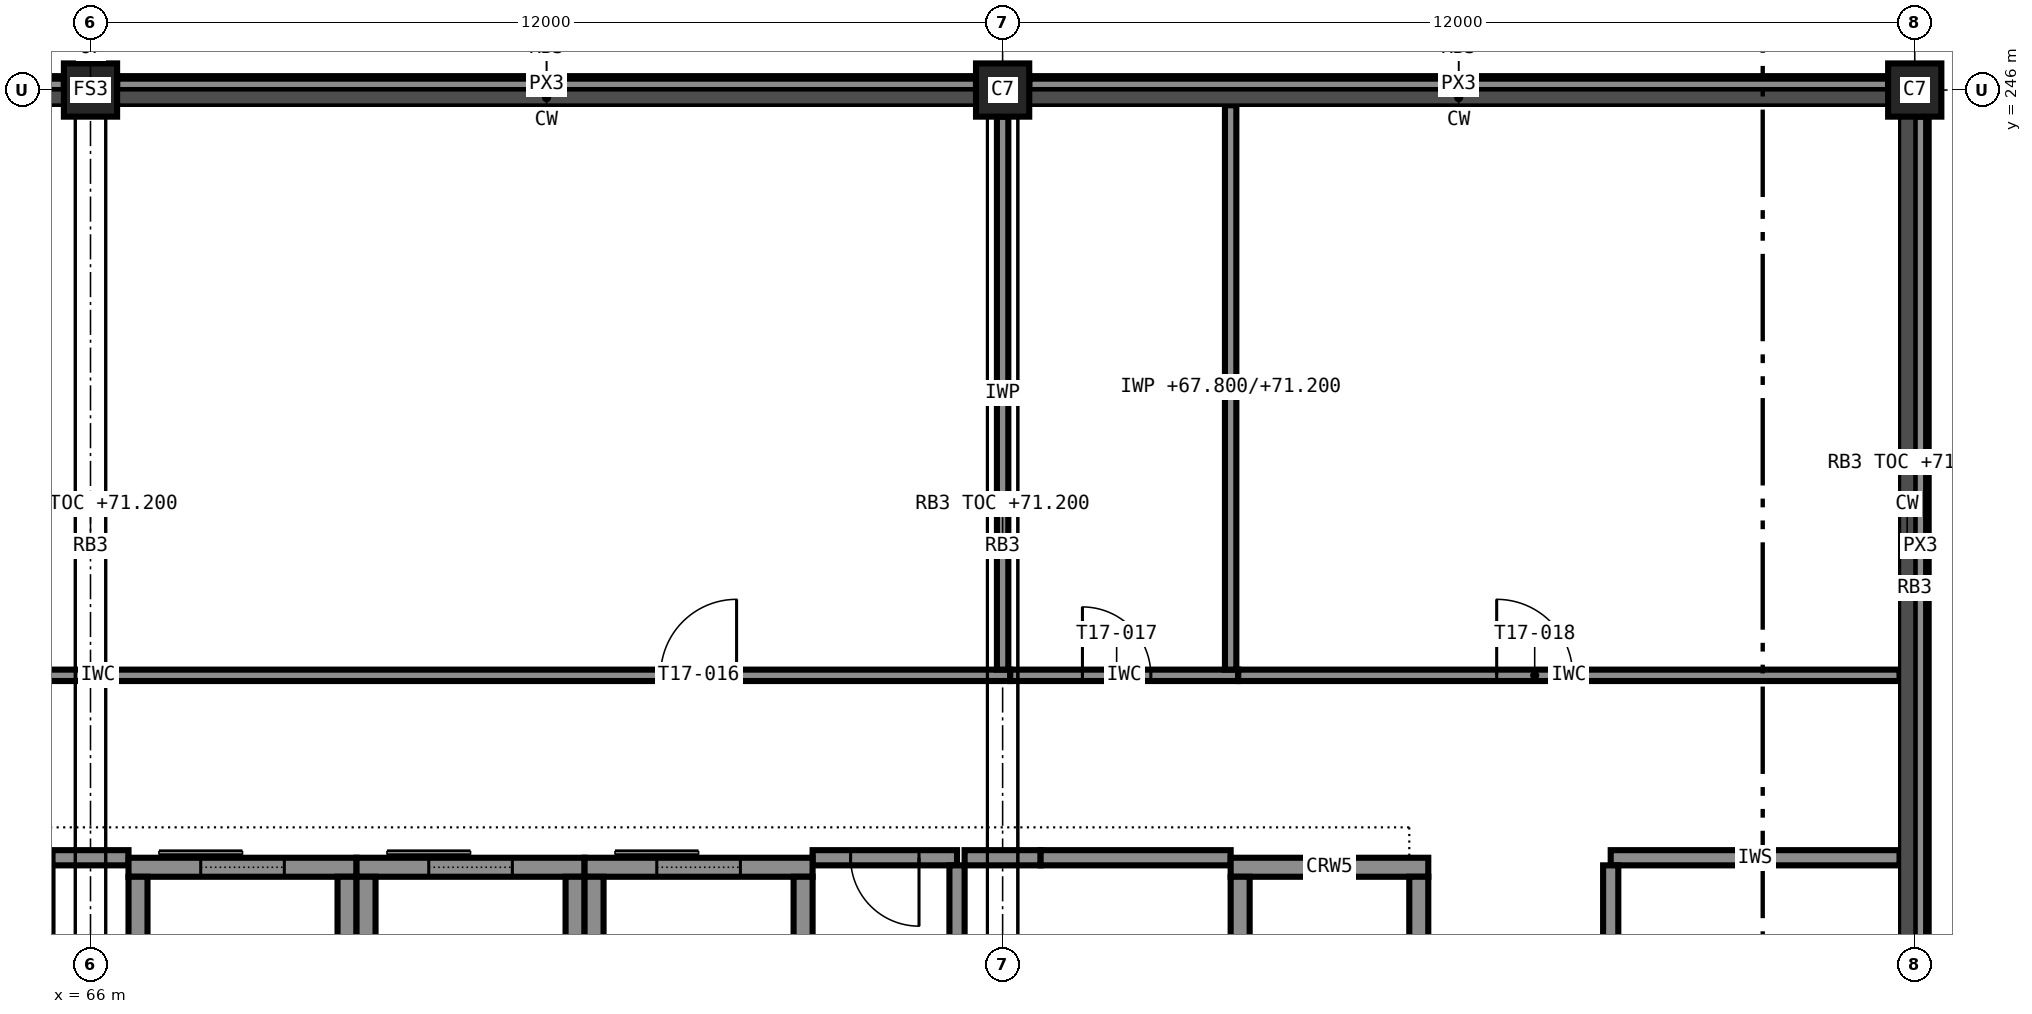
"""IFC4 building model, lengths in metres.
Left out: names, types, materials, properties, quantities, classifications, styles, units other than length and angle.
Written with IfcOpenShell. Run it as: python <this file> out.ifc"""

import sys

from ifc_helpers import new_model, si_unit, direction, frame, frame_2d, origin, origin_2d, place, context, subcontext, project, spatial, rectangle, extrude, element, fill, save


model = new_model("IFC4")
c1 = context("Model", 3, precision=1e-05, world=origin(), true_north=direction((0.0, 1.0)))
c2 = subcontext(c1, "Body", "Model", "MODEL_VIEW")
j1 = project(units=[si_unit("LENGTHUNIT", "METRE"), si_unit("PLANEANGLEUNIT", "RADIAN")], contexts=[c1])
p1 = place(None, origin())
s1 = spatial("IfcSite", under=j1, at=p1, CompositionType="ELEMENT")
p2 = place(p1, origin())
s2 = spatial("IfcBuilding", under=s1, at=p2, CompositionType="ELEMENT")
p3 = place(p2, frame((0.0, 0.0, 67.8)))
s3 = spatial("IfcBuildingStorey", under=s2, at=p3, CompositionType="ELEMENT", Elevation=67.8)
for number, where, z_axis, x_axis in (
    (1, (66.0, 246.0, 0.0), (0.0, 0.0, 1.0), (1.0, 0.0, 0.0)),
    (2, (78.0, 246.0, 0.0), (0.0, 0.0, 1.0), (1.0, 0.0, 0.0)),
    (3, (90.0, 246.0, 0.0), (0.0, 0.0, 1.0), (1.0, 0.0, 0.0)),
):
    element("IfcColumn", number, at=place(p3, frame(where, z_axis=z_axis, x_axis=x_axis)), inside=s3, PredefinedType="COLUMN", context=c2, shape_type="SweptSolid", body=[
        extrude(rectangle(XDim=0.7, YDim=0.7, at=origin_2d()), origin(), (0.0, 0.0, 1.0), 3.6),
    ])
p4 = place(p3, frame((66.5, 235.775, 0.0), z_axis=(0.0, 0.0, 1.0), x_axis=(1.0, 0.0, 0.0)))
e4 = element("IfcWall", 4, at=p4, inside=s3, PredefinedType="SHEAR", context=c2, shape_type="SweptSolid", body=[
    extrude(rectangle(XDim=3.0, YDim=0.25, at=frame_2d((1.5, 0.0))), origin(), (0.0, 0.0, 1.0), 3.6),
])
p5 = place(p4, frame((0.95, 0.0, 0.0)))
e5 = element("IfcOpeningElement", 5, at=p5, cuts=e4, PredefinedType="OPENING", context=c2, shape_type="SweptSolid", body=[
    extrude(rectangle(XDim=1.1, YDim=2.1, at=frame_2d((0.55, 1.05))), frame((0.0, 0.135, 0.0), z_axis=(0.0, -1.0, 0.0), x_axis=(1.0, 0.0, 0.0)), (0.0, 0.0, 1.0), 0.27),
])
for number, where, z_axis, x_axis in (
    (6, (66.625, 232.35, 0.0), (0.0, 0.0, 1.0), (0.0, 1.0, 0.0)),
    (7, (69.375, 232.35, 0.0), (0.0, 0.0, 1.0), (0.0, 1.0, 0.0)),
):
    element("IfcWall", number, at=place(p3, frame(where, z_axis=z_axis, x_axis=x_axis)), inside=s3, PredefinedType="SHEAR", context=c2, shape_type="SweptSolid", body=[
        extrude(rectangle(XDim=3.3, YDim=0.25, at=frame_2d((1.65, 0.0))), origin(), (0.0, 0.0, 1.0), 3.6),
    ])
p6 = place(p3, frame((69.5, 235.775, 0.0), z_axis=(0.0, 0.0, 1.0), x_axis=(1.0, 0.0, 0.0)))
e8 = element("IfcWall", 8, at=p6, inside=s3, PredefinedType="SHEAR", context=c2, shape_type="SweptSolid", body=[
    extrude(rectangle(XDim=3.0, YDim=0.25, at=frame_2d((1.5, 0.0))), origin(), (0.0, 0.0, 1.0), 3.6),
])
p7 = place(p6, frame((0.95, 0.0, 0.0)))
e9 = element("IfcOpeningElement", 9, at=p7, cuts=e8, PredefinedType="OPENING", context=c2, shape_type="SweptSolid", body=[
    extrude(rectangle(XDim=1.1, YDim=2.1, at=frame_2d((0.55, 1.05))), frame((0.0, 0.135, 0.0), z_axis=(0.0, -1.0, 0.0), x_axis=(1.0, 0.0, 0.0)), (0.0, 0.0, 1.0), 0.27),
])
for number, where, z_axis, x_axis in (
    (10, (69.625, 232.35, 0.0), (0.0, 0.0, 1.0), (0.0, 1.0, 0.0)),
    (11, (72.375, 232.35, 0.0), (0.0, 0.0, 1.0), (0.0, 1.0, 0.0)),
):
    element("IfcWall", number, at=place(p3, frame(where, z_axis=z_axis, x_axis=x_axis)), inside=s3, PredefinedType="SHEAR", context=c2, shape_type="SweptSolid", body=[
        extrude(rectangle(XDim=3.3, YDim=0.25, at=frame_2d((1.65, 0.0))), origin(), (0.0, 0.0, 1.0), 3.6),
    ])
p8 = place(p3, frame((72.5, 235.775, 0.0), z_axis=(0.0, 0.0, 1.0), x_axis=(1.0, 0.0, 0.0)))
e12 = element("IfcWall", 12, at=p8, inside=s3, PredefinedType="SHEAR", context=c2, shape_type="SweptSolid", body=[
    extrude(rectangle(XDim=3.0, YDim=0.25, at=frame_2d((1.5, 0.0))), origin(), (0.0, 0.0, 1.0), 3.6),
])
p9 = place(p8, frame((0.95, 0.0, 0.0)))
e13 = element("IfcOpeningElement", 13, at=p9, cuts=e12, PredefinedType="OPENING", context=c2, shape_type="SweptSolid", body=[
    extrude(rectangle(XDim=1.1, YDim=2.1, at=frame_2d((0.55, 1.05))), frame((0.0, 0.135, 0.0), z_axis=(0.0, -1.0, 0.0), x_axis=(1.0, 0.0, 0.0)), (0.0, 0.0, 1.0), 0.27),
])
for number, where, z_axis, x_axis in (
    (14, (72.625, 232.35, 0.0), (0.0, 0.0, 1.0), (0.0, 1.0, 0.0)),
    (15, (75.375, 232.35, 0.0), (0.0, 0.0, 1.0), (0.0, 1.0, 0.0)),
):
    element("IfcWall", number, at=place(p3, frame(where, z_axis=z_axis, x_axis=x_axis)), inside=s3, PredefinedType="SHEAR", context=c2, shape_type="SweptSolid", body=[
        extrude(rectangle(XDim=3.3, YDim=0.25, at=frame_2d((1.65, 0.0))), origin(), (0.0, 0.0, 1.0), 3.6),
    ])
p10 = place(p3, frame((81.0, 235.775, 0.0), z_axis=(0.0, 0.0, 1.0), x_axis=(1.0, 0.0, 0.0)))
e16 = element("IfcWall", 16, at=p10, inside=s3, PredefinedType="SHEAR", context=c2, shape_type="SweptSolid", body=[
    extrude(rectangle(XDim=2.6, YDim=0.25, at=frame_2d((1.3, 0.0))), origin(), (0.0, 0.0, 1.0), 3.6),
])
p11 = place(p3, frame((81.125, 232.35, 0.0), z_axis=(0.0, 0.0, 1.0), x_axis=(0.0, 1.0, 0.0)))
e17 = element("IfcWall", 17, at=p11, inside=s3, PredefinedType="SHEAR", context=c2, shape_type="SweptSolid", body=[
    extrude(rectangle(XDim=3.3, YDim=0.25, at=frame_2d((1.65, 0.0))), origin(), (0.0, 0.0, 1.0), 3.6),
])
p12 = place(p11, frame((1.1, 0.0, 0.0)))
e18 = element("IfcOpeningElement", 18, at=p12, cuts=e17, PredefinedType="OPENING", context=c2, shape_type="SweptSolid", body=[
    extrude(rectangle(XDim=1.1, YDim=2.1, at=frame_2d((0.55, 1.05))), frame((0.0, 0.135, 0.0), z_axis=(0.0, -1.0, 0.0), x_axis=(1.0, 0.0, 0.0)), (0.0, 0.0, 1.0), 0.27),
])
p13 = place(p3, frame((83.475, 232.35, 0.0), z_axis=(0.0, 0.0, 1.0), x_axis=(0.0, 1.0, 0.0)))
e19 = element("IfcWall", 19, at=p13, inside=s3, PredefinedType="SHEAR", context=c2, shape_type="SweptSolid", body=[
    extrude(rectangle(XDim=3.3, YDim=0.25, at=frame_2d((1.65, 0.0))), origin(), (0.0, 0.0, 1.0), 3.6),
])
for number, where, z_axis, x_axis in (
    (20, (90.075, 234.35, 3.4), (0.0, 0.0, 1.0), (0.0, 1.0, 0.0)),
    (21, (89.65, 246.075, 3.4), (0.0, 0.0, 1.0), (-1.0, 0.0, 0.0)),
    (22, (77.65, 246.075, 3.4), (0.0, 0.0, 1.0), (-1.0, 0.0, 0.0)),
    (23, (65.65, 246.075, 3.4), (0.0, 0.0, 1.0), (-1.0, 0.0, 0.0)),
):
    element("IfcWall", number, at=place(p3, frame(where, z_axis=z_axis, x_axis=x_axis)), inside=s3, PredefinedType="STANDARD", context=c2, shape_type="SweptSolid", body=[
        extrude(rectangle(XDim=11.3, YDim=0.15, at=frame_2d((5.65, 0.0))), origin(), (0.0, 0.0, 1.0), 0.2),
    ])
p14 = place(p3, frame((65.5, 235.9, 0.0), z_axis=(0.0, 0.0, 1.0), x_axis=(1.0, 0.0, 0.0)))
e24 = element("IfcWall", 24, at=p14, inside=s3, PredefinedType="PARTITIONING", context=c2, shape_type="SweptSolid", body=[
    extrude(rectangle(XDim=1.0, YDim=0.2, at=frame_2d((0.5, 0.0))), origin(), (0.0, 0.0, 1.0), 3.4),
])
p15 = place(p3, frame((77.4, 235.9, 0.0), z_axis=(0.0, 0.0, 1.0), x_axis=(-1.0, 0.0, 0.0)))
e25 = element("IfcWall", 25, at=p15, inside=s3, PredefinedType="PARTITIONING", context=c2, shape_type="SweptSolid", body=[
    extrude(rectangle(XDim=1.9, YDim=0.2, at=frame_2d((0.95, 0.0))), origin(), (0.0, 0.0, 1.0), 3.4),
])
p16 = place(p15, frame((0.5, 0.0, 0.0)))
e26 = element("IfcOpeningElement", 26, at=p16, cuts=e25, PredefinedType="OPENING", context=c2, shape_type="SweptSolid", body=[
    extrude(rectangle(XDim=0.9, YDim=2.1, at=frame_2d((0.45, 1.05))), frame((0.0, 0.11, 0.0), z_axis=(0.0, -1.0, 0.0), x_axis=(1.0, 0.0, 0.0)), (0.0, 0.0, 1.0), 0.22),
])
p17 = place(p3, frame((77.5, 235.9, 0.0), z_axis=(0.0, 0.0, 1.0), x_axis=(1.0, 0.0, 0.0)))
e27 = element("IfcWall", 27, at=p17, inside=s3, PredefinedType="PARTITIONING", context=c2, shape_type="SweptSolid", body=[
    extrude(rectangle(XDim=1.0, YDim=0.2, at=frame_2d((0.5, 0.0))), origin(), (0.0, 0.0, 1.0), 3.4),
])
p18 = place(p3, frame((78.5, 235.9, 0.0), z_axis=(0.0, 0.0, 1.0), x_axis=(1.0, 0.0, 0.0)))
e28 = element("IfcWall", 28, at=p18, inside=s3, PredefinedType="PARTITIONING", context=c2, shape_type="SweptSolid", body=[
    extrude(rectangle(XDim=2.5, YDim=0.2, at=frame_2d((1.25, 0.0))), origin(), (0.0, 0.0, 1.0), 3.4),
])
p19 = place(p3, frame((86.0, 235.9, 0.0), z_axis=(0.0, 0.0, 1.0), x_axis=(1.0, 0.0, 0.0)))
e29 = element("IfcWall", 29, at=p19, inside=s3, PredefinedType="PARTITIONING", context=c2, shape_type="SweptSolid", body=[
    extrude(rectangle(XDim=3.8, YDim=0.2, at=frame_2d((1.9, 0.0))), origin(), (0.0, 0.0, 1.0), 3.4),
])
p20 = place(p3, frame((77.4, 232.2, 0.0), z_axis=(0.0, 0.0, 1.0), x_axis=(0.0, 1.0, 0.0)))
e30 = element("IfcWall", 30, at=p20, inside=s3, PredefinedType="PARTITIONING", context=c2, shape_type="SweptSolid", body=[
    extrude(rectangle(XDim=3.6, YDim=0.2, at=frame_2d((1.8, 0.0))), origin(), (0.0, 0.0, 1.0), 3.4),
])
p21 = place(p3, frame((86.0, 235.8, 0.0), z_axis=(0.0, 0.0, 1.0), x_axis=(0.0, -1.0, 0.0)))
e31 = element("IfcWall", 31, at=p21, inside=s3, PredefinedType="PARTITIONING", context=c2, shape_type="SweptSolid", body=[
    extrude(rectangle(XDim=3.6, YDim=0.2, at=frame_2d((1.8, 0.0))), origin(), (0.0, 0.0, 1.0), 3.4),
])
p22 = place(p21, frame((1.35, 0.0, 0.0)))
e32 = element("IfcOpeningElement", 32, at=p22, cuts=e31, PredefinedType="OPENING", context=c2, shape_type="SweptSolid", body=[
    extrude(rectangle(XDim=0.9, YDim=2.1, at=frame_2d((0.45, 1.05))), frame((0.0, 0.11, 0.0), z_axis=(0.0, -1.0, 0.0), x_axis=(1.0, 0.0, 0.0)), (0.0, 0.0, 1.0), 0.22),
])
p23 = place(p3, frame((54.1, 238.3, 0.0), z_axis=(0.0, 0.0, 1.0), x_axis=(1.0, 0.0, 0.0)))
e33 = element("IfcWall", 33, at=p23, inside=s3, PredefinedType="PARTITIONING", context=c2, shape_type="SweptSolid", body=[
    extrude(rectangle(XDim=24.0, YDim=0.15, at=frame_2d((12.0, 0.0))), origin(), (0.0, 0.0, 1.0), 3.4),
])
p24 = place(p23, frame((3.4, 0.0, 0.0)))
e34 = element("IfcOpeningElement", 34, at=p24, cuts=e33, PredefinedType="OPENING", context=c2, shape_type="SweptSolid", body=[
    extrude(rectangle(XDim=1.0, YDim=2.1, at=frame_2d((0.5, 1.05))), frame((0.0, 0.085, 0.0), z_axis=(0.0, -1.0, 0.0), x_axis=(1.0, 0.0, 0.0)), (0.0, 0.0, 1.0), 0.17),
])
p25 = place(p23, frame((19.4, 0.0, 0.0)))
e35 = element("IfcOpeningElement", 35, at=p25, cuts=e33, PredefinedType="OPENING", context=c2, shape_type="SweptSolid", body=[
    extrude(rectangle(XDim=1.0, YDim=2.1, at=frame_2d((0.5, 1.05))), frame((0.0, 0.085, 0.0), z_axis=(0.0, -1.0, 0.0), x_axis=(1.0, 0.0, 0.0)), (0.0, 0.0, 1.0), 0.17),
])
p26 = place(p3, frame((78.1, 238.3, 0.0), z_axis=(0.0, 0.0, 1.0), x_axis=(1.0, 0.0, 0.0)))
e36 = element("IfcWall", 36, at=p26, inside=s3, PredefinedType="PARTITIONING", context=c2, shape_type="SweptSolid", body=[
    extrude(rectangle(XDim=3.0, YDim=0.15, at=frame_2d((1.5, 0.0))), origin(), (0.0, 0.0, 1.0), 3.4),
])
p27 = place(p26, frame((0.95, 0.0, 0.0)))
e37 = element("IfcOpeningElement", 37, at=p27, cuts=e36, PredefinedType="OPENING", context=c2, shape_type="SweptSolid", body=[
    extrude(rectangle(XDim=0.9, YDim=2.1, at=frame_2d((0.45, 1.05))), frame((0.0, 0.085, 0.0), z_axis=(0.0, -1.0, 0.0), x_axis=(1.0, 0.0, 0.0)), (0.0, 0.0, 1.0), 0.17),
])
p28 = place(p3, frame((78.0, 245.65, 0.0), z_axis=(0.0, 0.0, 1.0), x_axis=(0.0, -1.0, 0.0)))
e38 = element("IfcWall", 38, at=p28, inside=s3, PredefinedType="PARTITIONING", context=c2, shape_type="SweptSolid", body=[
    extrude(rectangle(XDim=7.275, YDim=0.15, at=frame_2d((3.637, 0.0))), origin(), (0.0, 0.0, 1.0), 2.6),
])
p29 = place(p3, frame((81.1, 238.3, 0.0), z_axis=(0.0, 0.0, 1.0), x_axis=(1.0, 0.0, 0.0)))
e39 = element("IfcWall", 39, at=p29, inside=s3, PredefinedType="PARTITIONING", context=c2, shape_type="SweptSolid", body=[
    extrude(rectangle(XDim=8.7, YDim=0.15, at=frame_2d((4.35, 0.0))), origin(), (0.0, 0.0, 1.0), 3.4),
])
p30 = place(p29, frame((3.4, 0.0, 0.0)))
e40 = element("IfcOpeningElement", 40, at=p30, cuts=e39, PredefinedType="OPENING", context=c2, shape_type="SweptSolid", body=[
    extrude(rectangle(XDim=1.0, YDim=2.1, at=frame_2d((0.5, 1.05))), frame((0.0, 0.085, 0.0), z_axis=(0.0, -1.0, 0.0), x_axis=(1.0, 0.0, 0.0)), (0.0, 0.0, 1.0), 0.17),
])
p31 = place(p3, frame((81.0, 245.8, 0.0), z_axis=(0.0, 0.0, 1.0), x_axis=(0.0, -1.0, 0.0)))
e41 = element("IfcWall", 41, at=p31, inside=s3, PredefinedType="PARTITIONING", context=c2, shape_type="SweptSolid", body=[
    extrude(rectangle(XDim=7.425, YDim=0.15, at=frame_2d((3.712, 0.0))), origin(), (0.0, 0.0, 1.0), 3.4),
])
p32 = place(p16, origin())
e42 = element("IfcDoor", 42, at=p32, inside=s3, OperationType="SINGLE_SWING_LEFT", PredefinedType="DOOR", context=c2, shape_type="SweptSolid", body=[
    extrude(rectangle(XDim=0.9, YDim=2.1, at=frame_2d((0.45, 1.05))), frame((0.0, 0.025, 0.0), z_axis=(0.0, -1.0, 0.0), x_axis=(1.0, 0.0, 0.0)), (0.0, 0.0, 1.0), 0.05),
])
fill(e26, e42)
p33 = place(p25, origin())
e43 = element("IfcDoor", 43, at=p33, inside=s3, OperationType="SINGLE_SWING_RIGHT", PredefinedType="DOOR", context=c2, shape_type="SweptSolid", body=[
    extrude(rectangle(XDim=1.0, YDim=2.1, at=frame_2d((0.5, 1.05))), frame((0.0, 0.025, 0.0), z_axis=(0.0, -1.0, 0.0), x_axis=(1.0, 0.0, 0.0)), (0.0, 0.0, 1.0), 0.05),
])
fill(e35, e43)
p34 = place(p27, origin())
e44 = element("IfcDoor", 44, at=p34, inside=s3, OperationType="SINGLE_SWING_LEFT", PredefinedType="DOOR", context=c2, shape_type="SweptSolid", body=[
    extrude(rectangle(XDim=0.9, YDim=2.1, at=frame_2d((0.45, 1.05))), frame((0.0, 0.025, 0.0), z_axis=(0.0, -1.0, 0.0), x_axis=(1.0, 0.0, 0.0)), (0.0, 0.0, 1.0), 0.05),
])
fill(e37, e44)
p35 = place(p30, origin())
e45 = element("IfcDoor", 45, at=p35, inside=s3, OperationType="SINGLE_SWING_LEFT", PredefinedType="DOOR", context=c2, shape_type="SweptSolid", body=[
    extrude(rectangle(XDim=1.0, YDim=2.1, at=frame_2d((0.5, 1.05))), frame((0.0, 0.025, 0.0), z_axis=(0.0, -1.0, 0.0), x_axis=(1.0, 0.0, 0.0)), (0.0, 0.0, 1.0), 0.05),
])
fill(e40, e45)
p36 = place(p5, origin())
e46 = element("IfcDoor", 46, at=p36, inside=s3, OperationType="SLIDING_TO_LEFT", PredefinedType="DOOR", context=c2, shape_type="SweptSolid", body=[
    extrude(rectangle(XDim=1.1, YDim=2.1, at=frame_2d((0.55, 1.05))), frame((0.0, 0.025, 0.0), z_axis=(0.0, -1.0, 0.0), x_axis=(1.0, 0.0, 0.0)), (0.0, 0.0, 1.0), 0.05),
])
fill(e5, e46)
p37 = place(p7, origin())
e47 = element("IfcDoor", 47, at=p37, inside=s3, OperationType="SLIDING_TO_LEFT", PredefinedType="DOOR", context=c2, shape_type="SweptSolid", body=[
    extrude(rectangle(XDim=1.1, YDim=2.1, at=frame_2d((0.55, 1.05))), frame((0.0, 0.025, 0.0), z_axis=(0.0, -1.0, 0.0), x_axis=(1.0, 0.0, 0.0)), (0.0, 0.0, 1.0), 0.05),
])
fill(e9, e47)
p38 = place(p9, origin())
e48 = element("IfcDoor", 48, at=p38, inside=s3, OperationType="SLIDING_TO_LEFT", PredefinedType="DOOR", context=c2, shape_type="SweptSolid", body=[
    extrude(rectangle(XDim=1.1, YDim=2.1, at=frame_2d((0.55, 1.05))), frame((0.0, 0.025, 0.0), z_axis=(0.0, -1.0, 0.0), x_axis=(1.0, 0.0, 0.0)), (0.0, 0.0, 1.0), 0.05),
])
fill(e13, e48)
save(model, sys.argv[1])
